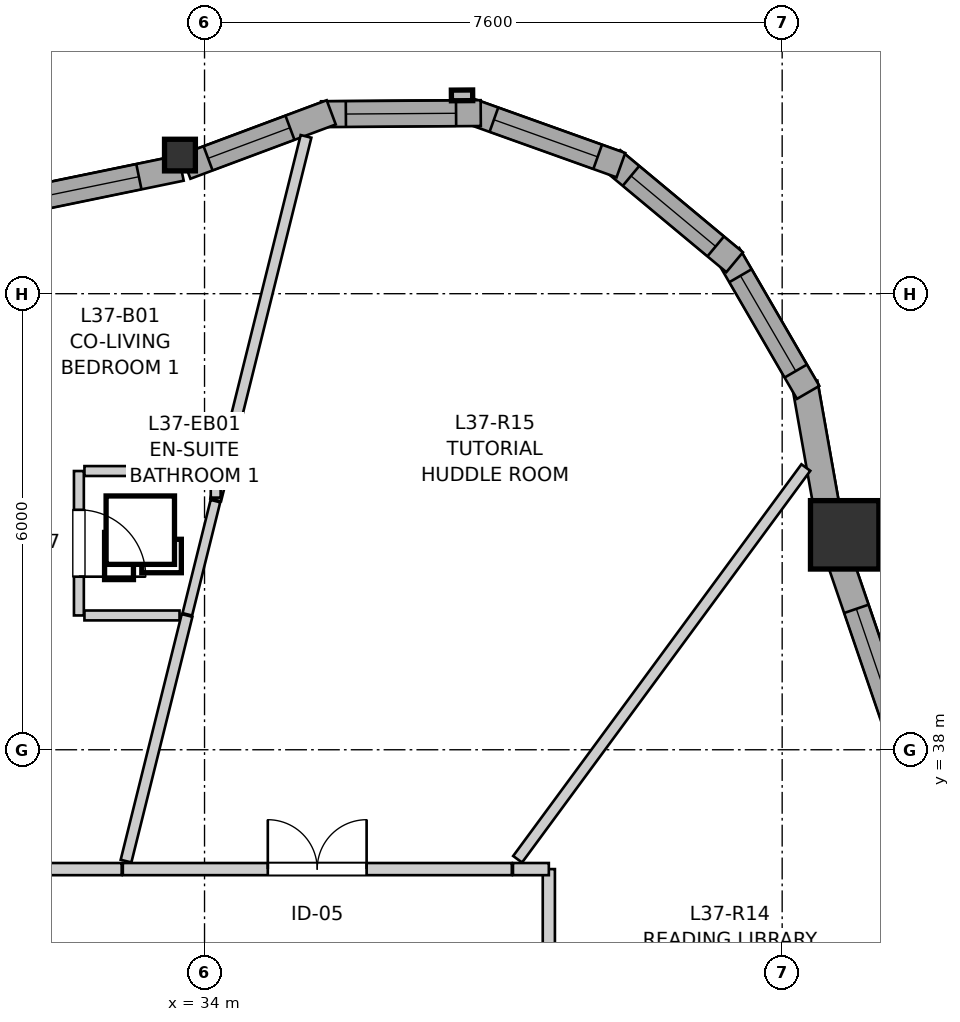
"""IFC4 building model, lengths in metres.
Left out: names, types, materials, properties, quantities, classifications, styles, units other than length and angle.
Written with IfcOpenShell. Run it as: python <this file> out.ifc"""

import sys

from ifc_helpers import new_model, si_unit, direction, frame, frame_2d, origin, origin_2d, place, context, subcontext, project, spatial, rectangle, i_section, extrude, source, transform, mapped, element, fill, save


model = new_model("IFC4")
c1 = context("Model", 3, precision=1e-05, world=origin(), true_north=direction((0.0, 1.0)))
c2 = subcontext(c1, "Body", "Model", "MODEL_VIEW")
j1 = project(units=[si_unit("LENGTHUNIT", "METRE"), si_unit("PLANEANGLEUNIT", "RADIAN")], contexts=[c1])
p1 = place(None, origin())
s1 = spatial("IfcSite", under=j1, at=p1, CompositionType="ELEMENT")
p2 = place(p1, origin())
s2 = spatial("IfcBuilding", under=s1, at=p2, CompositionType="ELEMENT")
p3 = place(p2, frame((0.0, 0.0, 124.8)))
s3 = spatial("IfcBuildingStorey", under=s2, at=p3, CompositionType="ELEMENT", Elevation=124.8)
m1 = source(origin(), c2, "Body", "SweptSolid", [
    extrude(rectangle(XDim=0.9, YDim=0.9, at=origin_2d()), origin(), (0.0, 0.0, 1.0), 2.9),
])
p4 = place(p3, frame((42.423, 40.828, 0.0), z_axis=(0.0, 0.0, 1.0), x_axis=(1.0, 0.0, 0.0)))
e1 = element("IfcColumn", 1, at=p4, inside=s3, PredefinedType="COLUMN", context=c2, shape_type="MappedRepresentation", body=[
    mapped(m1, transform((0.0, 0.0, 0.0), x_axis=(1.0, 0.0, 0.0), y_axis=(0.0, 1.0, 0.0), z_axis=(0.0, 0.0, 1.0), scale=1.0)),
])
m2 = source(origin(), c2, "Body", "SweptSolid", [
    extrude(i_section(OverallWidth=0.406, OverallDepth=0.416, WebThickness=0.027, FlangeThickness=0.044, FilletRadius=0.015, at=origin_2d()), origin(), (0.0, 0.0, 1.0), 2.9),
])
p5 = place(p3, frame((33.677, 45.824, 0.0), z_axis=(0.0, 0.0, 1.0), x_axis=(1.0, 0.0, 0.0)))
e2 = element("IfcColumn", 2, at=p5, inside=s3, PredefinedType="PILASTER", context=c2, shape_type="MappedRepresentation", body=[
    mapped(m2, transform((0.0, 0.0, 0.0), x_axis=(1.0, 0.0, 0.0), y_axis=(0.0, 1.0, 0.0), z_axis=(0.0, 0.0, 1.0), scale=1.0)),
])
p6 = place(p3, frame((43.288, 37.771, 0.0), z_axis=(0.0, 0.0, 1.0), x_axis=(-0.323537149191, 0.94621546864, 0.0)))
e3 = element("IfcWall", 3, at=p6, inside=s3, PredefinedType="SOLIDWALL", context=c2, shape_type="SweptSolid", body=[
    extrude(rectangle(XDim=2.942, YDim=0.34, at=frame_2d((1.471, 0.0))), origin(), (0.0, 0.0, 1.0), 2.43),
])
p7 = place(p6, frame((0.751, 0.0, 0.82)))
e4 = element("IfcOpeningElement", 4, at=p7, cuts=e3, PredefinedType="OPENING", context=c2, shape_type="SweptSolid", body=[
    extrude(rectangle(XDim=1.45, YDim=1.25, at=frame_2d((0.725, 0.625))), frame((0.0, 0.18, 0.0), z_axis=(0.0, -1.0, 0.0), x_axis=(1.0, 0.0, 0.0)), (0.0, 0.0, 1.0), 0.36),
])
p8 = place(p3, frame((42.215, 41.024, 0.0), z_axis=(0.0, 0.0, 1.0), x_axis=(-0.17440141227, 0.984674640375, 0.0)))
e5 = element("IfcWall", 5, at=p8, inside=s3, PredefinedType="SOLIDWALL", context=c2, shape_type="SweptSolid", body=[
    extrude(rectangle(XDim=1.831, YDim=0.34, at=frame_2d((0.916, 0.0))), origin(), (0.0, 0.0, 1.0), 2.43),
])
p9 = place(p3, frame((41.942, 42.701, 0.0), z_axis=(0.0, 0.0, 1.0), x_axis=(-0.501902596059, 0.864924149315, 0.0)))
e6 = element("IfcWall", 6, at=p9, inside=s3, PredefinedType="SOLIDWALL", context=c2, shape_type="SweptSolid", body=[
    extrude(rectangle(XDim=2.099, YDim=0.34, at=frame_2d((1.049, 0.0))), origin(), (0.0, 0.0, 1.0), 2.43),
])
p10 = place(p9, frame((0.324, 0.0, 0.82)))
e7 = element("IfcOpeningElement", 7, at=p10, cuts=e6, PredefinedType="OPENING", context=c2, shape_type="SweptSolid", body=[
    extrude(rectangle(XDim=1.45, YDim=1.25, at=frame_2d((0.725, 0.625))), frame((0.0, 0.18, 0.0), z_axis=(0.0, -1.0, 0.0), x_axis=(1.0, 0.0, 0.0)), (0.0, 0.0, 1.0), 0.36),
])
p11 = place(p3, frame((40.975, 44.414, 0.0), z_axis=(0.0, 0.0, 1.0), x_axis=(-0.768440501876, 0.639921241308, 0.0)))
e8 = element("IfcWall", 8, at=p11, inside=s3, PredefinedType="SOLIDWALL", context=c2, shape_type="SweptSolid", body=[
    extrude(rectangle(XDim=2.099, YDim=0.34, at=frame_2d((1.05, 0.0))), origin(), (0.0, 0.0, 1.0), 2.43),
])
p12 = place(p11, frame((0.324, 0.0, 0.82)))
e9 = element("IfcOpeningElement", 9, at=p12, cuts=e8, PredefinedType="OPENING", context=c2, shape_type="SweptSolid", body=[
    extrude(rectangle(XDim=1.45, YDim=1.25, at=frame_2d((0.725, 0.625))), frame((0.0, 0.18, 0.0), z_axis=(0.0, -1.0, 0.0), x_axis=(1.0, 0.0, 0.0)), (0.0, 0.0, 1.0), 0.36),
])
p13 = place(p3, frame((39.478, 45.691, 0.0), z_axis=(0.0, 0.0, 1.0), x_axis=(-0.941523304278, 0.336947870598, 0.0)))
e10 = element("IfcWall", 10, at=p13, inside=s3, PredefinedType="SOLIDWALL", context=c2, shape_type="SweptSolid", body=[
    extrude(rectangle(XDim=2.099, YDim=0.34, at=frame_2d((1.05, 0.0))), origin(), (0.0, 0.0, 1.0), 2.43),
])
p14 = place(p13, frame((0.324, 0.0, 0.82)))
e11 = element("IfcOpeningElement", 11, at=p14, cuts=e10, PredefinedType="OPENING", context=c2, shape_type="SweptSolid", body=[
    extrude(rectangle(XDim=1.45, YDim=1.25, at=frame_2d((0.725, 0.625))), frame((0.0, 0.18, 0.0), z_axis=(0.0, -1.0, 0.0), x_axis=(1.0, 0.0, 0.0)), (0.0, 0.0, 1.0), 0.36),
])
p15 = place(p3, frame((37.634, 46.376, 0.0), z_axis=(0.0, 0.0, 1.0), x_axis=(-0.999976456891, -0.00686189939, 0.0)))
e12 = element("IfcWall", 12, at=p15, inside=s3, PredefinedType="SOLIDWALL", context=c2, shape_type="SweptSolid", body=[
    extrude(rectangle(XDim=2.099, YDim=0.34, at=frame_2d((1.05, 0.0))), origin(), (0.0, 0.0, 1.0), 2.43),
])
p16 = place(p15, frame((0.324, 0.0, 0.82)))
e13 = element("IfcOpeningElement", 13, at=p16, cuts=e12, PredefinedType="OPENING", context=c2, shape_type="SweptSolid", body=[
    extrude(rectangle(XDim=1.45, YDim=1.25, at=frame_2d((0.725, 0.625))), frame((0.0, 0.18, 0.0), z_axis=(0.0, -1.0, 0.0), x_axis=(1.0, 0.0, 0.0)), (0.0, 0.0, 1.0), 0.36),
])
p17 = place(p3, frame((35.667, 46.386, 0.0), z_axis=(0.0, 0.0, 1.0), x_axis=(-0.936761017964, -0.34996970615, 0.0)))
e14 = element("IfcWall", 14, at=p17, inside=s3, PredefinedType="SOLIDWALL", context=c2, shape_type="SweptSolid", body=[
    extrude(rectangle(XDim=2.041, YDim=0.34, at=frame_2d((1.021, 0.0))), origin(), (0.0, 0.0, 1.0), 2.43),
])
p18 = place(p17, frame((0.579, 0.0, 0.82)))
e15 = element("IfcOpeningElement", 15, at=p18, cuts=e14, PredefinedType="OPENING", context=c2, shape_type="SweptSolid", body=[
    extrude(rectangle(XDim=1.15, YDim=1.2, at=frame_2d((0.575, 0.6))), frame((0.0, 0.18, 0.0), z_axis=(0.0, -1.0, 0.0), x_axis=(1.0, 0.0, 0.0)), (0.0, 0.0, 1.0), 0.36),
])
p19 = place(p3, frame((33.691, 45.653, 0.0), z_axis=(0.0, 0.0, 1.0), x_axis=(-0.979414063846, -0.201861565287, 0.0)))
e16 = element("IfcWall", 16, at=p19, inside=s3, PredefinedType="SOLIDWALL", context=c2, shape_type="SweptSolid", body=[
    extrude(rectangle(XDim=3.104, YDim=0.34, at=frame_2d((1.552, 0.0))), origin(), (0.0, 0.0, 1.0), 2.43),
])
p20 = place(p19, frame((0.567, 0.0, 0.82)))
e17 = element("IfcOpeningElement", 17, at=p20, cuts=e16, PredefinedType="OPENING", context=c2, shape_type="SweptSolid", body=[
    extrude(rectangle(XDim=1.95, YDim=1.4, at=frame_2d((0.975, 0.7))), frame((0.0, 0.18, 0.0), z_axis=(0.0, -1.0, 0.0), x_axis=(1.0, 0.0, 0.0)), (0.0, 0.0, 1.0), 0.36),
])
p21 = place(p3, frame((38.53, 36.43, 0.0), z_axis=(0.0, 0.0, 1.0), x_axis=(0.0, -1.0, 0.0)))
e18 = element("IfcWall", 18, at=p21, inside=s3, PredefinedType="PARTITIONING", context=c2, shape_type="SweptSolid", body=[
    extrude(rectangle(XDim=7.083, YDim=0.16, at=frame_2d((3.542, 0.0))), origin(), (0.0, 0.0, 1.0), 2.538),
])
p22 = place(p21, frame((3.053, 0.0, 0.0)))
e19 = element("IfcOpeningElement", 19, at=p22, cuts=e18, PredefinedType="OPENING", context=c2, shape_type="SweptSolid", body=[
    extrude(rectangle(XDim=0.96, YDim=2.1, at=frame_2d((0.48, 1.05))), frame((0.0, 0.09, 0.0), z_axis=(0.0, -1.0, 0.0), x_axis=(1.0, 0.0, 0.0)), (0.0, 0.0, 1.0), 0.18),
])
p23 = place(p3, frame((32.925, 36.43, 0.0), z_axis=(0.0, 0.0, 1.0), x_axis=(1.0, 0.0, 0.0)))
e20 = element("IfcWall", 20, at=p23, inside=s3, PredefinedType="PARTITIONING", context=c2, shape_type="SweptSolid", body=[
    extrude(rectangle(XDim=5.118, YDim=0.16, at=frame_2d((2.559, 0.0))), origin(), (0.0, 0.0, 1.0), 2.538),
])
p24 = place(p23, frame((1.907, 0.0, 0.0)))
e21 = element("IfcOpeningElement", 21, at=p24, cuts=e20, PredefinedType="OPENING", context=c2, shape_type="SweptSolid", body=[
    extrude(rectangle(XDim=1.3, YDim=2.1, at=frame_2d((0.65, 1.05))), frame((0.0, 0.09, 0.0), z_axis=(0.0, -1.0, 0.0), x_axis=(1.0, 0.0, 0.0)), (0.0, 0.0, 1.0), 0.18),
])
p25 = place(p3, frame((30.063, 36.43, 0.0), z_axis=(0.0, 0.0, 1.0), x_axis=(1.0, 0.0, 0.0)))
e22 = element("IfcWall", 22, at=p25, inside=s3, PredefinedType="PARTITIONING", context=c2, shape_type="SweptSolid", body=[
    extrude(rectangle(XDim=2.847, YDim=0.16, at=frame_2d((1.423, 0.0))), origin(), (0.0, 0.0, 1.0), 2.9),
])
p26 = place(p25, frame((0.964, 0.0, 0.0)))
e23 = element("IfcOpeningElement", 23, at=p26, cuts=e22, PredefinedType="OPENING", context=c2, shape_type="SweptSolid", body=[
    extrude(rectangle(XDim=0.92, YDim=2.1, at=frame_2d((0.46, 1.05))), frame((0.0, 0.09, 0.0), z_axis=(0.0, -1.0, 0.0), x_axis=(1.0, 0.0, 0.0)), (0.0, 0.0, 1.0), 0.18),
])
p27 = place(p3, frame((32.347, 41.667, 0.0), z_axis=(0.0, 0.0, 1.0), x_axis=(0.0, -1.0, 0.0)))
e24 = element("IfcWall", 24, at=p27, inside=s3, PredefinedType="PARTITIONING", context=c2, shape_type="SweptSolid", body=[
    extrude(rectangle(XDim=1.9, YDim=0.13, at=frame_2d((0.95, 0.0))), origin(), (0.0, 0.0, 1.0), 2.9),
])
p28 = place(p27, frame((0.51, 0.0, 0.0)))
e25 = element("IfcOpeningElement", 25, at=p28, cuts=e24, PredefinedType="OPENING", context=c2, shape_type="SweptSolid", body=[
    extrude(rectangle(XDim=0.88, YDim=2.05, at=frame_2d((0.44, 1.025))), frame((0.0, 0.075, 0.0), z_axis=(0.0, -1.0, 0.0), x_axis=(1.0, 0.0, 0.0)), (0.0, 0.0, 1.0), 0.15),
])
p29 = place(p3, frame((38.119, 36.559, 0.0), z_axis=(0.0, 0.0, 1.0), x_axis=(0.592704345809, 0.805420113021, 0.0)))
e26 = element("IfcWall", 26, at=p29, inside=s3, PredefinedType="PARTITIONING", context=c2, shape_type="SweptSolid", body=[
    extrude(rectangle(XDim=6.399, YDim=0.145, at=frame_2d((3.199, 0.0))), origin(), (0.0, 0.0, 1.0), 2.9),
])
p30 = place(p3, frame((34.147, 41.286, 0.0), z_axis=(0.0, 0.0, 1.0), x_axis=(0.241055314039, 0.970511378384, 0.0)))
e27 = element("IfcWall", 27, at=p30, inside=s3, PredefinedType="PARTITIONING", context=c2, shape_type="SweptSolid", body=[
    extrude(rectangle(XDim=4.929, YDim=0.145, at=frame_2d((2.465, 0.0))), origin(), (0.0, 0.0, 1.0), 2.9),
])
p31 = place(p3, frame((32.967, 36.535, 0.0), z_axis=(0.0, 0.0, 1.0), x_axis=(0.241120890255, 0.970495088232, 0.0)))
e28 = element("IfcWall", 28, at=p31, inside=s3, PredefinedType="PARTITIONING", context=c2, shape_type="SweptSolid", body=[
    extrude(rectangle(XDim=3.33, YDim=0.145, at=frame_2d((1.665, 0.0))), origin(), (0.0, 0.0, 1.0), 2.9),
])
p32 = place(p3, frame((32.42, 41.667, 0.0), z_axis=(0.0, 0.0, 1.0), x_axis=(1.0, 0.0, 0.0)))
e29 = element("IfcWall", 29, at=p32, inside=s3, PredefinedType="PARTITIONING", context=c2, shape_type="SweptSolid", body=[
    extrude(rectangle(XDim=1.628, YDim=0.13, at=frame_2d((0.814, 0.0))), origin(), (0.0, 0.0, 1.0), 2.9),
])
p33 = place(p3, frame((33.774, 39.781, 0.0), z_axis=(0.0, 0.0, 1.0), x_axis=(0.240776504653, 0.970580586457, 0.0)))
e30 = element("IfcWall", 30, at=p33, inside=s3, PredefinedType="PARTITIONING", context=c2, shape_type="SweptSolid", body=[
    extrude(rectangle(XDim=1.535, YDim=0.13, at=frame_2d((0.768, 0.0))), origin(), (0.0, 0.0, 1.0), 2.9),
])
p34 = place(p3, frame((32.42, 39.767, 0.0), z_axis=(0.0, 0.0, 1.0), x_axis=(1.0, 0.0, 0.0)))
e31 = element("IfcWall", 31, at=p34, inside=s3, PredefinedType="PARTITIONING", context=c2, shape_type="SweptSolid", body=[
    extrude(rectangle(XDim=1.251, YDim=0.13, at=frame_2d((0.625, 0.0))), origin(), (0.0, 0.0, 1.0), 2.9),
])
p35 = place(p3, frame((38.058, 36.43, 0.0), z_axis=(0.0, 0.0, 1.0), x_axis=(1.0, 0.0, 0.0)))
e32 = element("IfcWall", 32, at=p35, inside=s3, PredefinedType="PARTITIONING", context=c2, shape_type="SweptSolid", body=[
    extrude(rectangle(XDim=0.472, YDim=0.16, at=frame_2d((0.236, 0.0))), origin(), (0.0, 0.0, 1.0), 2.538),
])
p36 = place(p3, frame((34.147, 41.317, 0.0), z_axis=(0.0, 0.0, 1.0), x_axis=(0.0, 1.0, 0.0)))
e33 = element("IfcWall", 33, at=p36, inside=s3, PredefinedType="PARTITIONING", context=c2, shape_type="SweptSolid", body=[
    extrude(rectangle(XDim=0.35, YDim=0.13, at=frame_2d((0.175, 0.0))), origin(), (0.0, 0.0, 1.0), 2.9),
])
m3 = source(origin(), c2, "Body", "SweptSolid", [
    extrude(rectangle(XDim=1.45, YDim=1.25, at=frame_2d((0.725, 0.625))), frame((0.0, 0.03, 0.0), z_axis=(0.0, -1.0, 0.0), x_axis=(1.0, 0.0, 0.0)), (0.0, 0.0, 1.0), 0.06),
])
p37 = place(p7, origin())
e34 = element("IfcWindow", 34, at=p37, inside=s3, PartitioningType="SINGLE_PANEL", PredefinedType="WINDOW", context=c2, shape_type="MappedRepresentation", body=[
    mapped(m3, transform((0.0, 0.0, 0.0), x_axis=(1.0, 0.0, 0.0), y_axis=(0.0, 1.0, 0.0), z_axis=(0.0, 0.0, 1.0), scale=1.0)),
])
fill(e4, e34)
p38 = place(p10, origin())
e35 = element("IfcWindow", 35, at=p38, inside=s3, PartitioningType="SINGLE_PANEL", PredefinedType="WINDOW", context=c2, shape_type="MappedRepresentation", body=[
    mapped(m3, transform((0.0, 0.0, 0.0), x_axis=(1.0, 0.0, 0.0), y_axis=(0.0, 1.0, 0.0), z_axis=(0.0, 0.0, 1.0), scale=1.0)),
])
fill(e7, e35)
p39 = place(p12, origin())
e36 = element("IfcWindow", 36, at=p39, inside=s3, PartitioningType="SINGLE_PANEL", PredefinedType="WINDOW", context=c2, shape_type="MappedRepresentation", body=[
    mapped(m3, transform((0.0, 0.0, 0.0), x_axis=(1.0, 0.0, 0.0), y_axis=(0.0, 1.0, 0.0), z_axis=(0.0, 0.0, 1.0), scale=1.0)),
])
fill(e9, e36)
p40 = place(p14, origin())
e37 = element("IfcWindow", 37, at=p40, inside=s3, PartitioningType="SINGLE_PANEL", PredefinedType="WINDOW", context=c2, shape_type="MappedRepresentation", body=[
    mapped(m3, transform((0.0, 0.0, 0.0), x_axis=(1.0, 0.0, 0.0), y_axis=(0.0, 1.0, 0.0), z_axis=(0.0, 0.0, 1.0), scale=1.0)),
])
fill(e11, e37)
p41 = place(p16, origin())
e38 = element("IfcWindow", 38, at=p41, inside=s3, PartitioningType="SINGLE_PANEL", PredefinedType="WINDOW", context=c2, shape_type="MappedRepresentation", body=[
    mapped(m3, transform((0.0, 0.0, 0.0), x_axis=(1.0, 0.0, 0.0), y_axis=(0.0, 1.0, 0.0), z_axis=(0.0, 0.0, 1.0), scale=1.0)),
])
fill(e13, e38)
m4 = source(origin(), c2, "Body", "SweptSolid", [
    extrude(rectangle(XDim=1.15, YDim=1.2, at=frame_2d((0.575, 0.6))), frame((0.0, 0.03, 0.0), z_axis=(0.0, -1.0, 0.0), x_axis=(1.0, 0.0, 0.0)), (0.0, 0.0, 1.0), 0.06),
])
p42 = place(p18, origin())
e39 = element("IfcWindow", 39, at=p42, inside=s3, PartitioningType="SINGLE_PANEL", PredefinedType="WINDOW", context=c2, shape_type="MappedRepresentation", body=[
    mapped(m4, transform((0.0, 0.0, 0.0), x_axis=(1.0, 0.0, 0.0), y_axis=(0.0, 1.0, 0.0), z_axis=(0.0, 0.0, 1.0), scale=1.0)),
])
fill(e15, e39)
m5 = source(origin(), c2, "Body", "SweptSolid", [
    extrude(rectangle(XDim=1.95, YDim=1.4, at=frame_2d((0.975, 0.7))), frame((0.0, 0.03, 0.0), z_axis=(0.0, -1.0, 0.0), x_axis=(1.0, 0.0, 0.0)), (0.0, 0.0, 1.0), 0.06),
])
p43 = place(p20, origin())
e40 = element("IfcWindow", 40, at=p43, inside=s3, PartitioningType="SINGLE_PANEL", PredefinedType="WINDOW", context=c2, shape_type="MappedRepresentation", body=[
    mapped(m5, transform((0.0, 0.0, 0.0), x_axis=(1.0, 0.0, 0.0), y_axis=(0.0, 1.0, 0.0), z_axis=(0.0, 0.0, 1.0), scale=1.0)),
])
fill(e17, e40)
m6 = source(origin(), c2, "Body", "SweptSolid", [
    extrude(rectangle(XDim=1.3, YDim=2.1, at=frame_2d((0.65, 1.05))), frame((0.0, 0.025, 0.0), z_axis=(0.0, -1.0, 0.0), x_axis=(1.0, 0.0, 0.0)), (0.0, 0.0, 1.0), 0.05),
])
p44 = place(p24, origin())
e41 = element("IfcDoor", 41, at=p44, inside=s3, OperationType="DOUBLE_DOOR_SINGLE_SWING", PredefinedType="DOOR", context=c2, shape_type="MappedRepresentation", body=[
    mapped(m6, transform((0.0, 0.0, 0.0), x_axis=(1.0, 0.0, 0.0), y_axis=(0.0, 1.0, 0.0), z_axis=(0.0, 0.0, 1.0), scale=1.0)),
])
fill(e21, e41)
m7 = source(origin(), c2, "Body", "SweptSolid", [
    extrude(rectangle(XDim=0.88, YDim=2.05, at=frame_2d((0.44, 1.025))), frame((0.0, 0.025, 0.0), z_axis=(0.0, -1.0, 0.0), x_axis=(1.0, 0.0, 0.0)), (0.0, 0.0, 1.0), 0.05),
])
p45 = place(p28, origin())
e42 = element("IfcDoor", 42, at=p45, inside=s3, OperationType="SINGLE_SWING_RIGHT", PredefinedType="DOOR", context=c2, shape_type="MappedRepresentation", body=[
    mapped(m7, transform((0.0, 0.0, 0.0), x_axis=(1.0, 0.0, 0.0), y_axis=(0.0, 1.0, 0.0), z_axis=(0.0, 0.0, 1.0), scale=1.0)),
])
fill(e25, e42)
save(model, sys.argv[1])
